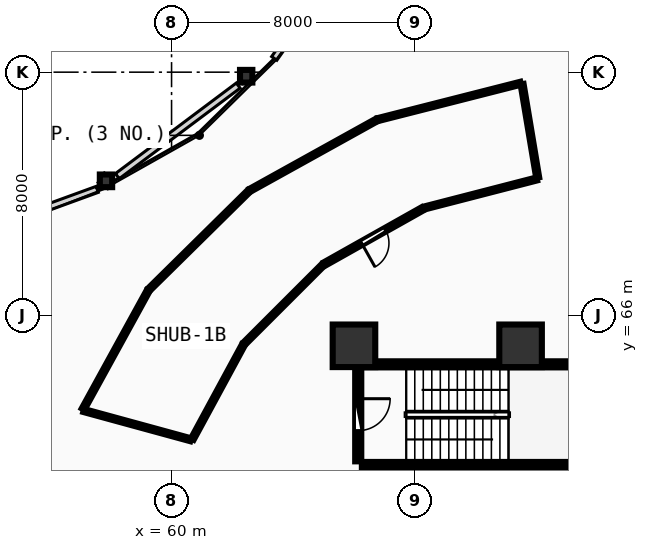
"""IFC4 building model, lengths in metres.
Left out: names, types, materials, properties, quantities, classifications, styles, units other than length and angle.
Written with IfcOpenShell. Run it as: python <this file> out.ifc"""

import sys

from ifc_helpers import new_model, si_unit, direction, frame, frame_2d, origin, origin_2d, place, context, subcontext, project, spatial, rectangle, i_section, extrude, element, fill, save


model = new_model("IFC4")
c1 = context("Model", 3, precision=1e-05, world=origin(), true_north=direction((0.0, 1.0)))
c2 = subcontext(c1, "Body", "Model", "MODEL_VIEW")
j1 = project(units=[si_unit("LENGTHUNIT", "METRE"), si_unit("PLANEANGLEUNIT", "RADIAN")], contexts=[c1])
p1 = place(None, origin())
s1 = spatial("IfcSite", under=j1, at=p1, CompositionType="ELEMENT")
p2 = place(p1, origin())
s2 = spatial("IfcBuilding", under=s1, at=p2, CompositionType="ELEMENT")
p3 = place(p2, frame((0.0, 0.0, 4.5)))
s3 = spatial("IfcBuildingStorey", under=s2, at=p3, CompositionType="ELEMENT", Elevation=4.5)
for number, where, z_axis, x_axis in (
    (1, (71.48, 65.0, 0.0), (0.0, 0.0, 1.0), (1.0, 0.0, 0.0)),
    (2, (66.0, 65.0, 0.0), (0.0, 0.0, 1.0), (1.0, 0.0, 0.0)),
):
    element("IfcColumn", number, at=place(p3, frame(where, z_axis=z_axis, x_axis=x_axis)), inside=s3, PredefinedType="PILASTER", context=c2, shape_type="SweptSolid", body=[
        extrude(rectangle(XDim=1.4, YDim=1.4, at=origin_2d()), origin(), (0.0, 0.0, 1.0), 4.5),
    ])
for number, where, z_axis, x_axis in (
    (3, (62.454, 73.866, 0.0), (0.0, 0.0, 1.0), (1.0, 0.0, 0.0)),
    (4, (57.844, 70.426, 0.0), (0.0, 0.0, 1.0), (1.0, 0.0, 0.0)),
):
    element("IfcColumn", number, at=place(p3, frame(where, z_axis=z_axis, x_axis=x_axis)), inside=s3, PredefinedType="COLUMN", context=c2, shape_type="SweptSolid", body=[
        extrude(i_section(OverallWidth=0.406, OverallDepth=0.416, WebThickness=0.029, FlangeThickness=0.048, FilletRadius=0.015, at=origin_2d()), origin(), (0.0, 0.0, 1.0), 4.5),
    ])
for number, where, z_axis, x_axis in (
    (5, (66.26, 61.08, 0.0), (0.0, 0.0, 1.0), (1.0, 0.0, 0.0)),
    (6, (73.42, 64.39, 0.0), (0.0, 0.0, 1.0), (-1.0, 0.0, 0.0)),
):
    element("IfcWall", number, at=place(p3, frame(where, z_axis=z_axis, x_axis=x_axis)), inside=s3, PredefinedType="SHEAR", context=c2, shape_type="SweptSolid", body=[
        extrude(rectangle(XDim=7.16, YDim=0.2, at=frame_2d((3.58, 0.0))), origin(), (0.0, 0.0, 1.0), 4.2),
    ])
p4 = place(p3, frame((66.14, 64.27, 0.0), z_axis=(0.0, 0.0, 1.0), x_axis=(0.0, -1.0, 0.0)))
e7 = element("IfcWall", 7, at=p4, inside=s3, PredefinedType="SHEAR", context=c2, shape_type="SweptSolid", body=[
    extrude(rectangle(XDim=3.07, YDim=0.2, at=frame_2d((1.535, 0.0))), origin(), (0.0, 0.0, 1.0), 4.2),
])
p5 = place(p4, frame((1.01, 0.0, 0.0)))
e8 = element("IfcOpeningElement", 8, at=p5, cuts=e7, PredefinedType="OPENING", context=c2, shape_type="SweptSolid", body=[
    extrude(rectangle(XDim=1.05, YDim=2.1, at=frame_2d((0.525, 1.05))), frame((0.0, 0.11, 0.0), z_axis=(0.0, -1.0, 0.0), x_axis=(1.0, 0.0, 0.0)), (0.0, 0.0, 1.0), 0.22),
])
for number, where, z_axis, x_axis in (
    (9, (66.46, 58.48, 0.0), (0.0, 0.0, 1.0), (0.0, 1.0, 0.0)),
    (10, (72.34, 58.48, 0.0), (0.0, 0.0, 1.0), (0.0, 1.0, 0.0)),
):
    element("IfcWall", number, at=place(p3, frame(where, z_axis=z_axis, x_axis=x_axis)), inside=s3, PredefinedType="PARTITIONING", context=c2, shape_type="SweptSolid", body=[
        extrude(rectangle(XDim=2.46, YDim=0.15, at=frame_2d((1.23, 0.0))), origin(), (0.0, 0.0, 1.0), 4.19),
    ])
p6 = place(p3, frame((68.246, 69.5, 0.0), z_axis=(0.0, 0.0, 1.0), x_axis=(-0.871548943047, -0.490308514993, 0.0)))
e11 = element("IfcWall", 11, at=p6, inside=s3, PredefinedType="PARTITIONING", context=c2, shape_type="SweptSolid", body=[
    extrude(rectangle(XDim=3.678, YDim=0.12, at=frame_2d((1.839, 0.0))), origin(), (0.0, 0.0, 1.0), 3.585),
])
p7 = place(p6, frame((1.389, 0.0, 0.0)))
e12 = element("IfcOpeningElement", 12, at=p7, cuts=e11, PredefinedType="OPENING", context=c2, shape_type="SweptSolid", body=[
    extrude(rectangle(XDim=0.9, YDim=2.08, at=frame_2d((0.45, 1.04))), frame((0.0, 0.07, 0.0), z_axis=(0.0, -1.0, 0.0), x_axis=(1.0, 0.0, 0.0)), (0.0, 0.0, 1.0), 0.14),
])
p8 = place(p3, frame((72.01, 70.487, 0.0), z_axis=(0.0, 0.0, 1.0), x_axis=(-0.96827883043, -0.249872180405, 0.0)))
e13 = element("IfcWall", 13, at=p8, inside=s3, PredefinedType="PARTITIONING", context=c2, shape_type="SweptSolid", body=[
    extrude(rectangle(XDim=3.794, YDim=0.1, at=frame_2d((1.897, 0.0))), origin(), (0.0, 0.0, 1.0), 3.585),
])
p9 = place(p3, frame((64.96, 67.639, 0.0), z_axis=(0.0, 0.0, 1.0), x_axis=(-0.707241957398, -0.706971579129, 0.0)))
e14 = element("IfcWall", 14, at=p9, inside=s3, PredefinedType="PARTITIONING", context=c2, shape_type="SweptSolid", body=[
    extrude(rectangle(XDim=3.612, YDim=0.1, at=frame_2d((1.806, 0.0))), origin(), (0.0, 0.0, 1.0), 3.585),
])
p10 = place(p3, frame((62.358, 65.022, 0.0), z_axis=(0.0, 0.0, 1.0), x_axis=(-0.476511645664, -0.879168158856, 0.0)))
e15 = element("IfcWall", 15, at=p10, inside=s3, PredefinedType="PARTITIONING", context=c2, shape_type="SweptSolid", body=[
    extrude(rectangle(XDim=3.511, YDim=0.1, at=frame_2d((1.755, 0.0))), origin(), (0.0, 0.0, 1.0), 4.19),
])
p11 = place(p3, frame((60.627, 61.91, 0.0), z_axis=(0.0, 0.0, 1.0), x_axis=(-0.964640120238, 0.263570556831, 0.0)))
e16 = element("IfcWall", 16, at=p11, inside=s3, PredefinedType="PARTITIONING", context=c2, shape_type="SweptSolid", body=[
    extrude(rectangle(XDim=3.647, YDim=0.1, at=frame_2d((1.823, 0.0))), origin(), (0.0, 0.0, 1.0), 3.945),
])
p12 = place(p3, frame((57.09, 62.917, 0.0), z_axis=(0.0, 0.0, 1.0), x_axis=(0.481529459126, 0.876429905922, 0.0)))
e17 = element("IfcWall", 17, at=p12, inside=s3, PredefinedType="PARTITIONING", context=c2, shape_type="SweptSolid", body=[
    extrude(rectangle(XDim=4.43, YDim=0.1, at=frame_2d((2.215, 0.0))), origin(), (0.0, 0.0, 1.0), 3.585),
])
p13 = place(p3, frame((59.271, 66.863, 0.0), z_axis=(0.0, 0.0, 1.0), x_axis=(0.712024911857, 0.702154203075, 0.0)))
e18 = element("IfcWall", 18, at=p13, inside=s3, PredefinedType="PARTITIONING", context=c2, shape_type="SweptSolid", body=[
    extrude(rectangle(XDim=4.576, YDim=0.1, at=frame_2d((2.288, 0.0))), origin(), (0.0, 0.0, 1.0), 3.585),
])
p14 = place(p3, frame((62.593, 70.123, 0.0), z_axis=(0.0, 0.0, 1.0), x_axis=(0.874546970914, 0.484940816663, 0.0)))
e19 = element("IfcWall", 19, at=p14, inside=s3, PredefinedType="PARTITIONING", context=c2, shape_type="SweptSolid", body=[
    extrude(rectangle(XDim=4.725, YDim=0.1, at=frame_2d((2.362, 0.0))), origin(), (0.0, 0.0, 1.0), 3.585),
])
p15 = place(p3, frame((66.799, 72.444, 0.0), z_axis=(0.0, 0.0, 1.0), x_axis=(0.969121093941, 0.246585290069, 0.0)))
e20 = element("IfcWall", 20, at=p15, inside=s3, PredefinedType="PARTITIONING", context=c2, shape_type="SweptSolid", body=[
    extrude(rectangle(XDim=4.834, YDim=0.1, at=frame_2d((2.417, 0.0))), origin(), (0.0, 0.0, 1.0), 3.585),
])
p16 = place(p3, frame((71.53, 73.606, 0.0), z_axis=(0.0, 0.0, 1.0), x_axis=(0.164806022155, -0.98632599837, 0.0)))
e21 = element("IfcWall", 21, at=p16, inside=s3, PredefinedType="PARTITIONING", context=c2, shape_type="SweptSolid", body=[
    extrude(rectangle(XDim=3.112, YDim=0.1, at=frame_2d((1.556, 0.0))), origin(), (0.0, 0.0, 1.0), 3.945),
])
p17 = place(p5, origin())
e22 = element("IfcDoor", 22, at=p17, inside=s3, OperationType="SINGLE_SWING_LEFT", PredefinedType="DOOR", context=c2, shape_type="SweptSolid", body=[
    extrude(rectangle(XDim=1.05, YDim=2.1, at=frame_2d((0.525, 1.05))), frame((0.0, 0.025, 0.0), z_axis=(0.0, -1.0, 0.0), x_axis=(1.0, 0.0, 0.0)), (0.0, 0.0, 1.0), 0.05),
])
fill(e8, e22)
p18 = place(p7, origin())
e23 = element("IfcDoor", 23, at=p18, inside=s3, OperationType="SINGLE_SWING_RIGHT", PredefinedType="DOOR", context=c2, shape_type="SweptSolid", body=[
    extrude(rectangle(XDim=0.9, YDim=2.08, at=frame_2d((0.45, 1.04))), frame((0.0, 0.025, 0.0), z_axis=(0.0, -1.0, 0.0), x_axis=(1.0, 0.0, 0.0)), (0.0, 0.0, 1.0), 0.05),
])
fill(e12, e23)
save(model, sys.argv[1])
